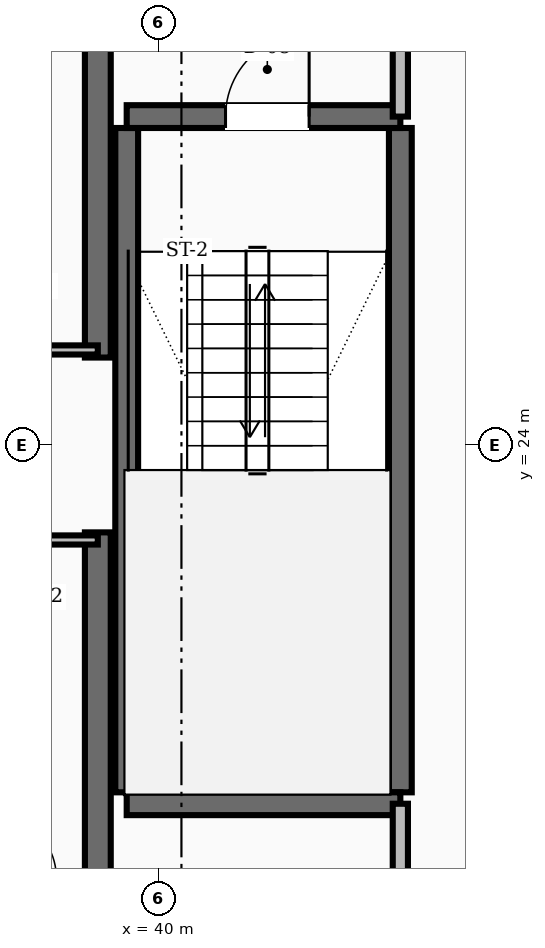
"""IFC4 building model, lengths in metres.
Left out: names, types, materials, properties, quantities, classifications, styles, units other than length and angle.
Written with IfcOpenShell. Run it as: python <this file> out.ifc"""

import sys

from ifc_helpers import new_model, si_unit, direction, frame, frame_2d, origin, place, context, subcontext, project, spatial, rectangle, extrude, element, fill, save


model = new_model("IFC4")
c1 = context("Model", 3, precision=1e-05, world=origin(), true_north=direction((0.0, 1.0)))
c2 = subcontext(c1, "Body", "Model", "MODEL_VIEW")
j1 = project(units=[si_unit("LENGTHUNIT", "METRE"), si_unit("PLANEANGLEUNIT", "RADIAN")], contexts=[c1])
p1 = place(None, origin())
s1 = spatial("IfcSite", under=j1, at=p1, CompositionType="ELEMENT")
p2 = place(p1, origin())
s2 = spatial("IfcBuilding", under=s1, at=p2, CompositionType="ELEMENT")
p3 = place(p2, frame((0.0, 0.0, 192.8)))
s3 = spatial("IfcBuildingStorey", under=s2, at=p3, CompositionType="ELEMENT", Elevation=192.8)
for number, where, z_axis, x_axis in (
    (1, (39.2, 16.55, 0.0), (0.0, 0.0, 1.0), (0.0, 1.0, 0.0)),
    (2, (39.2, 25.15, 0.0), (0.0, 0.0, 1.0), (0.0, 1.0, 0.0)),
):
    element("IfcWall", number, at=place(p3, frame(where, z_axis=z_axis, x_axis=x_axis)), inside=s3, PredefinedType="SHEAR", context=c2, shape_type="SweptSolid", body=[
        extrude(rectangle(XDim=6.3, YDim=0.34, at=frame_2d((3.15, 0.0))), origin(), (0.0, 0.0, 1.0), 3.6),
    ])
for number, where, z_axis, x_axis in (
    (3, (43.18, 19.43, 0.0), (0.0, 0.0, 1.0), (0.0, 1.0, 0.0)),
    (4, (39.58, 19.43, 0.0), (0.0, 0.0, 1.0), (0.0, 1.0, 0.0)),
):
    element("IfcWall", number, at=place(p3, frame(where, z_axis=z_axis, x_axis=x_axis)), inside=s3, PredefinedType="SHEAR", context=c2, shape_type="SweptSolid", body=[
        extrude(rectangle(XDim=8.74, YDim=0.3, at=frame_2d((4.37, 0.0))), origin(), (0.0, 0.0, 1.0), 3.6),
    ])
p4 = place(p3, frame((39.58, 19.28, 0.0), z_axis=(0.0, 0.0, 1.0), x_axis=(1.0, 0.0, 0.0)))
e5 = element("IfcWall", 5, at=p4, inside=s3, PredefinedType="SHEAR", context=c2, shape_type="SweptSolid", body=[
    extrude(rectangle(XDim=3.6, YDim=0.3, at=frame_2d((1.8, 0.0))), origin(), (0.0, 0.0, 1.0), 3.6),
])
p5 = place(p3, frame((39.58, 28.32, 0.0), z_axis=(0.0, 0.0, 1.0), x_axis=(1.0, 0.0, 0.0)))
e6 = element("IfcWall", 6, at=p5, inside=s3, PredefinedType="SHEAR", context=c2, shape_type="SweptSolid", body=[
    extrude(rectangle(XDim=3.6, YDim=0.3, at=frame_2d((1.8, 0.0))), origin(), (0.0, 0.0, 1.0), 3.6),
])
p6 = place(p5, frame((1.3, 0.0, 0.0)))
e7 = element("IfcOpeningElement", 7, at=p6, cuts=e6, PredefinedType="OPENING", context=c2, shape_type="SweptSolid", body=[
    extrude(rectangle(XDim=1.1, YDim=2.1, at=frame_2d((0.55, 1.05))), frame((0.0, 0.16, 0.0), z_axis=(0.0, -1.0, 0.0), x_axis=(1.0, 0.0, 0.0)), (0.0, 0.0, 1.0), 0.32),
])
p7 = place(p3, frame((43.18, 28.32, 0.0), z_axis=(0.0, 0.0, 1.0), x_axis=(0.0, 1.0, 0.0)))
e8 = element("IfcWall", 8, at=p7, inside=s3, PredefinedType="SOLIDWALL", context=c2, shape_type="SweptSolid", body=[
    extrude(rectangle(XDim=3.13, YDim=0.2, at=frame_2d((1.565, 0.0))), origin(), (0.0, 0.0, 1.0), 2.8),
])
p8 = place(p7, frame((1.015, 0.0, 0.0)))
e9 = element("IfcOpeningElement", 9, at=p8, cuts=e8, PredefinedType="OPENING", context=c2, shape_type="SweptSolid", body=[
    extrude(rectangle(XDim=1.1, YDim=2.1, at=frame_2d((0.55, 1.05))), frame((0.0, 0.11, 0.0), z_axis=(0.0, -1.0, 0.0), x_axis=(1.0, 0.0, 0.0)), (0.0, 0.0, 1.0), 0.22),
])
p9 = place(p3, frame((43.18, 16.55, 0.0), z_axis=(0.0, 0.0, 1.0), x_axis=(0.0, 1.0, 0.0)))
e10 = element("IfcWall", 10, at=p9, inside=s3, PredefinedType="SOLIDWALL", context=c2, shape_type="SweptSolid", body=[
    extrude(rectangle(XDim=2.73, YDim=0.2, at=frame_2d((1.365, 0.0))), origin(), (0.0, 0.0, 1.0), 2.8),
])
p10 = place(p9, frame((0.89, 0.0, 0.0)))
e11 = element("IfcOpeningElement", 11, at=p10, cuts=e10, PredefinedType="OPENING", context=c2, shape_type="SweptSolid", body=[
    extrude(rectangle(XDim=0.95, YDim=2.1, at=frame_2d((0.475, 1.05))), frame((0.0, 0.11, 0.0), z_axis=(0.0, -1.0, 0.0), x_axis=(1.0, 0.0, 0.0)), (0.0, 0.0, 1.0), 0.22),
])
for number, where, z_axis, x_axis in (
    (12, (37.4, 25.25, 0.0), (0.0, 0.0, 1.0), (1.0, 0.0, 0.0)),
    (13, (37.4, 22.75, 0.0), (0.0, 0.0, 1.0), (1.0, 0.0, 0.0)),
):
    element("IfcWall", number, at=place(p3, frame(where, z_axis=z_axis, x_axis=x_axis)), inside=s3, PredefinedType="PARTITIONING", context=c2, shape_type="SweptSolid", body=[
        extrude(rectangle(XDim=1.8, YDim=0.12, at=frame_2d((0.9, 0.0))), origin(), (0.0, 0.0, 1.0), 2.8),
    ])
p11 = place(p6, origin())
e14 = element("IfcDoor", 14, at=p11, inside=s3, OperationType="SINGLE_SWING_RIGHT", PredefinedType="DOOR", context=c2, shape_type="SweptSolid", body=[
    extrude(rectangle(XDim=1.1, YDim=2.1, at=frame_2d((0.55, 1.05))), frame((0.0, 0.025, 0.0), z_axis=(0.0, -1.0, 0.0), x_axis=(1.0, 0.0, 0.0)), (0.0, 0.0, 1.0), 0.05),
])
fill(e7, e14)
save(model, sys.argv[1])
